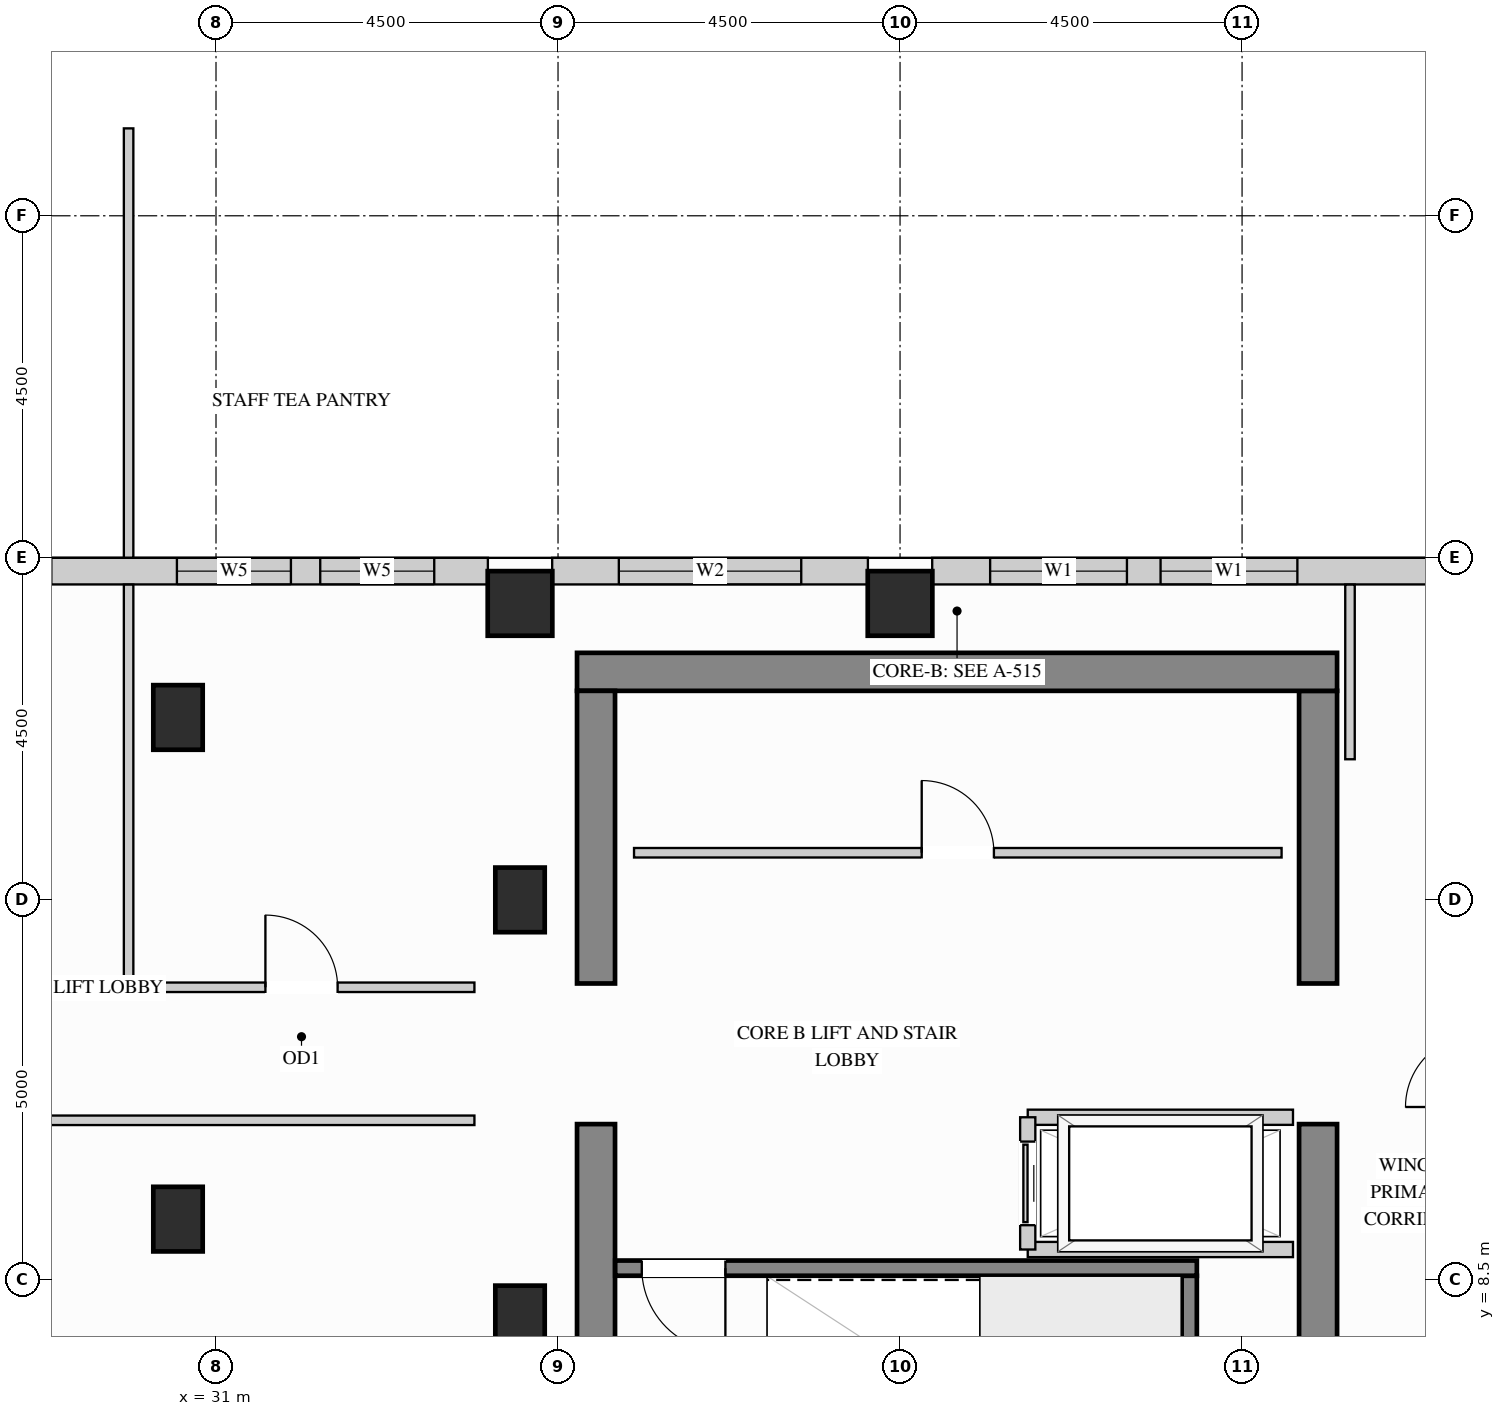
"""IFC4 building model, lengths in metres.
Left out: names, types, materials, properties, quantities, classifications, styles, units other than length and angle.
Written with IfcOpenShell. Run it as: python <this file> out.ifc"""

import sys

from ifc_helpers import new_model, si_unit, direction, frame, frame_2d, origin, origin_2d, place, context, subcontext, project, spatial, rectangle, extrude, source, transform, mapped, element, fill, save


model = new_model("IFC4")
c1 = context("Model", 3, precision=1e-05, world=origin(), true_north=direction((0.0, 1.0)))
c2 = subcontext(c1, "Body", "Model", "MODEL_VIEW")
j1 = project(units=[si_unit("LENGTHUNIT", "METRE"), si_unit("PLANEANGLEUNIT", "RADIAN")], contexts=[c1])
p1 = place(None, origin())
s1 = spatial("IfcSite", under=j1, at=p1, CompositionType="ELEMENT")
p2 = place(p1, origin())
s2 = spatial("IfcBuilding", under=s1, at=p2, CompositionType="ELEMENT")
p3 = place(p2, frame((0.0, 0.0, 212.4)))
s3 = spatial("IfcBuildingStorey", under=s2, at=p3, CompositionType="ELEMENT", Elevation=212.4)
m1 = source(origin(), c2, "Body", "SweptSolid", [
    extrude(rectangle(XDim=0.65, YDim=0.85, at=origin_2d()), origin(), (0.0, 0.0, 1.0), 3.4),
])
for number, where, z_axis, x_axis in (
    (1, (35.0, 13.5, 0.0), (0.0, 0.0, 1.0), (1.0, 0.0, 0.0)),
    (2, (35.0, 8.0, 0.0), (0.0, 0.0, 1.0), (1.0, 0.0, 0.0)),
    (3, (30.5, 15.9, 0.0), (0.0, 0.0, 1.0), (1.0, 0.0, 0.0)),
    (4, (30.5, 9.3, 0.0), (0.0, 0.0, 1.0), (1.0, 0.0, 0.0)),
):
    element("IfcColumn", number, at=place(p3, frame(where, z_axis=z_axis, x_axis=x_axis)), inside=s3, PredefinedType="COLUMN", context=c2, shape_type="MappedRepresentation", body=[
        mapped(m1, transform((0.0, 0.0, 0.0), x_axis=(1.0, 0.0, 0.0), y_axis=(0.0, 1.0, 0.0), z_axis=(0.0, 0.0, 1.0))),
    ])
m2 = source(origin(), c2, "Body", "SweptSolid", [
    extrude(rectangle(XDim=0.85, YDim=0.85, at=origin_2d()), origin(), (0.0, 0.0, 1.0), 3.4),
])
for number, where, z_axis, x_axis in (
    (5, (35.0, 17.4, 0.0), (0.0, 0.0, 1.0), (1.0, 0.0, 0.0)),
    (6, (40.0, 17.4, 0.0), (0.0, 0.0, 1.0), (1.0, 0.0, 0.0)),
):
    element("IfcColumn", number, at=place(p3, frame(where, z_axis=z_axis, x_axis=x_axis)), inside=s3, PredefinedType="COLUMN", context=c2, shape_type="MappedRepresentation", body=[
        mapped(m2, transform((0.0, 0.0, 0.0), x_axis=(1.0, 0.0, 0.0), y_axis=(0.0, 1.0, 0.0), z_axis=(0.0, 0.0, 1.0))),
    ])
m3 = source(origin(), c2, "Body", "SweptSolid", [
    extrude(rectangle(XDim=5.8, YDim=0.5, at=frame_2d((2.9, 0.0))), origin(), (0.0, 0.0, 1.0), 3.4),
])
p4 = place(p3, frame((45.5, 4.75, 0.0), z_axis=(0.0, 0.0, 1.0), x_axis=(0.0, 1.0, 0.0)))
e7 = element("IfcWall", 7, at=p4, inside=s3, PredefinedType="SHEAR", context=c2, shape_type="MappedRepresentation", body=[
    mapped(m3, transform((0.0, 0.0, 0.0), x_axis=(1.0, 0.0, 0.0), y_axis=(0.0, 1.0, 0.0), z_axis=(0.0, 0.0, 1.0))),
])
m4 = source(origin(), c2, "Body", "SweptSolid", [
    extrude(rectangle(XDim=3.85, YDim=0.5, at=frame_2d((1.925, 0.0))), origin(), (0.0, 0.0, 1.0), 3.4),
])
p5 = place(p3, frame((45.5, 12.4, 0.0), z_axis=(0.0, 0.0, 1.0), x_axis=(0.0, 1.0, 0.0)))
e8 = element("IfcWall", 8, at=p5, inside=s3, PredefinedType="SHEAR", context=c2, shape_type="MappedRepresentation", body=[
    mapped(m4, transform((0.0, 0.0, 0.0), x_axis=(1.0, 0.0, 0.0), y_axis=(0.0, 1.0, 0.0), z_axis=(0.0, 0.0, 1.0))),
])
m5 = source(origin(), c2, "Body", "SweptSolid", [
    extrude(rectangle(XDim=10.0, YDim=0.5, at=frame_2d((5.0, 0.0))), origin(), (0.0, 0.0, 1.0), 3.4),
])
p6 = place(p3, frame((35.75, 16.5, 0.0), z_axis=(0.0, 0.0, 1.0), x_axis=(1.0, 0.0, 0.0)))
e9 = element("IfcWall", 9, at=p6, inside=s3, PredefinedType="SHEAR", context=c2, shape_type="MappedRepresentation", body=[
    mapped(m5, transform((0.0, 0.0, 0.0), x_axis=(1.0, 0.0, 0.0), y_axis=(0.0, 1.0, 0.0), z_axis=(0.0, 0.0, 1.0))),
])
p7 = place(p3, frame((36.0, 4.75, 0.0), z_axis=(0.0, 0.0, 1.0), x_axis=(0.0, 1.0, 0.0)))
e10 = element("IfcWall", 10, at=p7, inside=s3, PredefinedType="SHEAR", context=c2, shape_type="MappedRepresentation", body=[
    mapped(m3, transform((0.0, 0.0, 0.0), x_axis=(1.0, 0.0, 0.0), y_axis=(0.0, 1.0, 0.0), z_axis=(0.0, 0.0, 1.0))),
])
p8 = place(p3, frame((36.0, 12.4, 0.0), z_axis=(0.0, 0.0, 1.0), x_axis=(0.0, 1.0, 0.0)))
e11 = element("IfcWall", 11, at=p8, inside=s3, PredefinedType="SHEAR", context=c2, shape_type="MappedRepresentation", body=[
    mapped(m4, transform((0.0, 0.0, 0.0), x_axis=(1.0, 0.0, 0.0), y_axis=(0.0, 1.0, 0.0), z_axis=(0.0, 0.0, 1.0))),
])
p9 = place(p3, frame((47.5, 17.825, 0.0), z_axis=(0.0, 0.0, 1.0), x_axis=(-1.0, 0.0, 0.0)))
e12 = element("IfcWall", 12, at=p9, inside=s3, PredefinedType="SOLIDWALL", context=c2, shape_type="SweptSolid", body=[
    extrude(rectangle(XDim=7.077, YDim=0.35, at=frame_2d((3.539, 0.0))), origin(), (0.0, 0.0, 1.0), 3.385),
])
p10 = place(p9, frame((2.272, 0.0, 0.78)))
e13 = element("IfcOpeningElement", 13, at=p10, cuts=e12, PredefinedType="OPENING", context=c2, shape_type="SweptSolid", body=[
    extrude(rectangle(XDim=1.8, YDim=2.1, at=frame_2d((0.9, 1.05))), frame((0.0, 0.185, 0.0), z_axis=(0.0, -1.0, 0.0), x_axis=(1.0, 0.0, 0.0)), (0.0, 0.0, 1.0), 0.37),
])
p11 = place(p9, frame((4.515, 0.0, 0.78)))
e14 = element("IfcOpeningElement", 14, at=p11, cuts=e12, PredefinedType="OPENING", context=c2, shape_type="SweptSolid", body=[
    extrude(rectangle(XDim=1.8, YDim=2.1, at=frame_2d((0.9, 1.05))), frame((0.0, 0.185, 0.0), z_axis=(0.0, -1.0, 0.0), x_axis=(1.0, 0.0, 0.0)), (0.0, 0.0, 1.0), 0.37),
])
p12 = place(p3, frame((39.577, 17.825, 0.0), z_axis=(0.0, 0.0, 1.0), x_axis=(-1.0, 0.0, 0.0)))
e15 = element("IfcWall", 15, at=p12, inside=s3, PredefinedType="SOLIDWALL", context=c2, shape_type="SweptSolid", body=[
    extrude(rectangle(XDim=4.154, YDim=0.35, at=frame_2d((2.077, 0.0))), origin(), (0.0, 0.0, 1.0), 3.385),
])
p13 = place(p12, frame((0.877, 0.0, 0.78)))
e16 = element("IfcOpeningElement", 16, at=p13, cuts=e15, PredefinedType="OPENING", context=c2, shape_type="SweptSolid", body=[
    extrude(rectangle(XDim=2.4, YDim=2.1, at=frame_2d((1.2, 1.05))), frame((0.0, 0.185, 0.0), z_axis=(0.0, -1.0, 0.0), x_axis=(1.0, 0.0, 0.0)), (0.0, 0.0, 1.0), 0.37),
])
p14 = place(p3, frame((34.577, 17.825, 0.0), z_axis=(0.0, 0.0, 1.0), x_axis=(-1.0, 0.0, 0.0)))
e17 = element("IfcWall", 17, at=p14, inside=s3, PredefinedType="SOLIDWALL", context=c2, shape_type="SweptSolid", body=[
    extrude(rectangle(XDim=15.254, YDim=0.35, at=frame_2d((7.627, 0.0))), origin(), (0.0, 0.0, 1.0), 3.385),
])
p15 = place(p14, frame((0.706, 0.0, 0.78)))
e18 = element("IfcOpeningElement", 18, at=p15, cuts=e17, PredefinedType="OPENING", context=c2, shape_type="SweptSolid", body=[
    extrude(rectangle(XDim=1.5, YDim=2.0, at=frame_2d((0.75, 1.0))), frame((0.0, 0.185, 0.0), z_axis=(0.0, -1.0, 0.0), x_axis=(1.0, 0.0, 0.0)), (0.0, 0.0, 1.0), 0.37),
])
p16 = place(p14, frame((2.591, 0.0, 0.78)))
e19 = element("IfcOpeningElement", 19, at=p16, cuts=e17, PredefinedType="OPENING", context=c2, shape_type="SweptSolid", body=[
    extrude(rectangle(XDim=1.5, YDim=2.0, at=frame_2d((0.75, 1.0))), frame((0.0, 0.185, 0.0), z_axis=(0.0, -1.0, 0.0), x_axis=(1.0, 0.0, 0.0)), (0.0, 0.0, 1.0), 0.37),
])
p17 = place(p14, frame((5.744, 0.0, 0.78)))
e20 = element("IfcOpeningElement", 20, at=p17, cuts=e17, PredefinedType="OPENING", context=c2, shape_type="SweptSolid", body=[
    extrude(rectangle(XDim=1.5, YDim=2.0, at=frame_2d((0.75, 1.0))), frame((0.0, 0.185, 0.0), z_axis=(0.0, -1.0, 0.0), x_axis=(1.0, 0.0, 0.0)), (0.0, 0.0, 1.0), 0.37),
])
p18 = place(p14, frame((8.01, 0.0, 0.78)))
e21 = element("IfcOpeningElement", 21, at=p18, cuts=e17, PredefinedType="OPENING", context=c2, shape_type="SweptSolid", body=[
    extrude(rectangle(XDim=1.5, YDim=2.0, at=frame_2d((0.75, 1.0))), frame((0.0, 0.185, 0.0), z_axis=(0.0, -1.0, 0.0), x_axis=(1.0, 0.0, 0.0)), (0.0, 0.0, 1.0), 0.37),
])
p19 = place(p14, frame((11.163, 0.0, 0.78)))
e22 = element("IfcOpeningElement", 22, at=p19, cuts=e17, PredefinedType="OPENING", context=c2, shape_type="SweptSolid", body=[
    extrude(rectangle(XDim=1.5, YDim=2.0, at=frame_2d((0.75, 1.0))), frame((0.0, 0.185, 0.0), z_axis=(0.0, -1.0, 0.0), x_axis=(1.0, 0.0, 0.0)), (0.0, 0.0, 1.0), 0.37),
])
p20 = place(p14, frame((13.048, 0.0, 0.78)))
e23 = element("IfcOpeningElement", 23, at=p20, cuts=e17, PredefinedType="OPENING", context=c2, shape_type="SweptSolid", body=[
    extrude(rectangle(XDim=1.5, YDim=2.0, at=frame_2d((0.75, 1.0))), frame((0.0, 0.185, 0.0), z_axis=(0.0, -1.0, 0.0), x_axis=(1.0, 0.0, 0.0)), (0.0, 0.0, 1.0), 0.37),
])
p21 = place(p3, frame((36.5, 14.12, 0.0), z_axis=(0.0, 0.0, 1.0), x_axis=(1.0, 0.0, 0.0)))
e24 = element("IfcWall", 24, at=p21, inside=s3, PredefinedType="PARTITIONING", context=c2, shape_type="SweptSolid", body=[
    extrude(rectangle(XDim=8.52, YDim=0.125, at=frame_2d((4.26, 0.0))), origin(), (0.0, 0.0, 1.0), 3.385),
])
p22 = place(p21, frame((3.785, 0.0, 0.0)))
e25 = element("IfcOpeningElement", 25, at=p22, cuts=e24, PredefinedType="OPENING", context=c2, shape_type="SweptSolid", body=[
    extrude(rectangle(XDim=0.95, YDim=2.15, at=frame_2d((0.475, 1.075))), frame((0.0, 0.073, 0.0), z_axis=(0.0, -1.0, 0.0), x_axis=(1.0, 0.0, 0.0)), (0.0, 0.0, 1.0), 0.145),
])
m6 = source(origin(), c2, "Body", "SweptSolid", [
    extrude(rectangle(XDim=2.298, YDim=0.125, at=frame_2d((1.149, 0.0))), origin(), (0.0, 0.0, 1.0), 3.385),
])
p23 = place(p3, frame((45.92, 15.35, 0.0), z_axis=(0.0, 0.0, 1.0), x_axis=(0.0, 1.0, 0.0)))
e26 = element("IfcWall", 26, at=p23, inside=s3, PredefinedType="PARTITIONING", context=c2, shape_type="MappedRepresentation", body=[
    mapped(m6, transform((0.0, 0.0, 0.0), x_axis=(1.0, 0.0, 0.0), y_axis=(0.0, 1.0, 0.0), z_axis=(0.0, 0.0, 1.0))),
])
m7 = source(origin(), c2, "Body", "SweptSolid", [
    extrude(rectangle(XDim=5.298, YDim=0.125, at=frame_2d((2.649, 0.0))), origin(), (0.0, 0.0, 1.0), 3.385),
])
p24 = place(p3, frame((29.85, 12.35, 0.0), z_axis=(0.0, 0.0, 1.0), x_axis=(0.0, 1.0, 0.0)))
e27 = element("IfcWall", 27, at=p24, inside=s3, PredefinedType="PARTITIONING", context=c2, shape_type="MappedRepresentation", body=[
    mapped(m7, transform((0.0, 0.0, 0.0), x_axis=(1.0, 0.0, 0.0), y_axis=(0.0, 1.0, 0.0), z_axis=(0.0, 0.0, 1.0))),
])
m8 = source(origin(), c2, "Body", "SweptSolid", [
    extrude(rectangle(XDim=5.648, YDim=0.125, at=frame_2d((2.824, 0.0))), origin(), (0.0, 0.0, 1.0), 3.385),
])
p25 = place(p3, frame((29.85, 18.002, 0.0), z_axis=(0.0, 0.0, 1.0), x_axis=(0.0, 1.0, 0.0)))
e28 = element("IfcWall", 28, at=p25, inside=s3, PredefinedType="PARTITIONING", context=c2, shape_type="MappedRepresentation", body=[
    mapped(m8, transform((0.0, 0.0, 0.0), x_axis=(1.0, 0.0, 0.0), y_axis=(0.0, 1.0, 0.0), z_axis=(0.0, 0.0, 1.0))),
])
p26 = place(p3, frame((29.85, 12.35, 0.0), z_axis=(0.0, 0.0, 1.0), x_axis=(1.0, 0.0, 0.0)))
e29 = element("IfcWall", 29, at=p26, inside=s3, PredefinedType="PARTITIONING", context=c2, shape_type="SweptSolid", body=[
    extrude(rectangle(XDim=4.55, YDim=0.125, at=frame_2d((2.275, 0.0))), origin(), (0.0, 0.0, 1.0), 3.385),
])
p27 = place(p26, frame((1.8, 0.0, 0.0)))
e30 = element("IfcOpeningElement", 30, at=p27, cuts=e29, PredefinedType="OPENING", context=c2, shape_type="SweptSolid", body=[
    extrude(rectangle(XDim=0.95, YDim=2.15, at=frame_2d((0.475, 1.075))), frame((0.0, 0.073, 0.0), z_axis=(0.0, -1.0, 0.0), x_axis=(1.0, 0.0, 0.0)), (0.0, 0.0, 1.0), 0.145),
])
p28 = place(p3, frame((19.5, 10.6, 0.0), z_axis=(0.0, 0.0, 1.0), x_axis=(1.0, 0.0, 0.0)))
e31 = element("IfcWall", 31, at=p28, inside=s3, PredefinedType="PARTITIONING", context=c2, shape_type="SweptSolid", body=[
    extrude(rectangle(XDim=14.9, YDim=0.125, at=frame_2d((7.45, 0.0))), origin(), (0.0, 0.0, 1.0), 3.385),
])
p29 = place(p28, frame((6.975, 0.0, 0.0)))
e32 = element("IfcOpeningElement", 32, at=p29, cuts=e31, PredefinedType="OPENING", context=c2, shape_type="SweptSolid", body=[
    extrude(rectangle(XDim=0.95, YDim=2.15, at=frame_2d((0.475, 1.075))), frame((0.0, 0.073, 0.0), z_axis=(0.0, -1.0, 0.0), x_axis=(1.0, 0.0, 0.0)), (0.0, 0.0, 1.0), 0.145),
])
m9 = source(origin(), c2, "Body", "SweptSolid", [
    extrude(rectangle(XDim=3.49, YDim=0.2, at=frame_2d((1.745, 0.0))), origin(), (0.0, 0.0, 1.0), 3.385),
])
for number, where, z_axis, x_axis in (
    (33, (41.68, 10.64, 0.0), (0.0, 0.0, 1.0), (1.0, 0.0, 0.0)),
    (34, (41.68, 8.9, 0.0), (0.0, 0.0, 1.0), (1.0, 0.0, 0.0)),
):
    element("IfcWall", number, at=place(p3, frame(where, z_axis=z_axis, x_axis=x_axis)), inside=s3, PredefinedType="PARTITIONING", context=c2, shape_type="MappedRepresentation", body=[
        mapped(m9, transform((0.0, 0.0, 0.0), x_axis=(1.0, 0.0, 0.0), y_axis=(0.0, 1.0, 0.0), z_axis=(0.0, 0.0, 1.0))),
    ])
p30 = place(p3, frame((41.68, 8.9, 0.0), z_axis=(0.0, 0.0, 1.0), x_axis=(0.0, 1.0, 0.0)))
e35 = element("IfcWall", 35, at=p30, inside=s3, PredefinedType="PARTITIONING", context=c2, shape_type="SweptSolid", body=[
    extrude(rectangle(XDim=1.74, YDim=0.2, at=frame_2d((0.87, 0.0))), origin(), (0.0, 0.0, 1.0), 3.385),
])
p31 = place(p30, frame((0.32, 0.0, 0.0)))
e36 = element("IfcOpeningElement", 36, at=p31, cuts=e35, PredefinedType="OPENING", context=c2, shape_type="SweptSolid", body=[
    extrude(rectangle(XDim=1.1, YDim=2.2, at=frame_2d((0.55, 1.1))), frame((0.0, 0.11, 0.0), z_axis=(0.0, -1.0, 0.0), x_axis=(1.0, 0.0, 0.0)), (0.0, 0.0, 1.0), 0.22),
])
m10 = source(origin(), c2, "Body", "SweptSolid", [
    extrude(rectangle(XDim=3.803, YDim=0.2, at=frame_2d((1.901, 0.0))), origin(), (0.0, 0.0, 1.0), 3.4),
])
p32 = place(p3, frame((43.805, 4.752, 0.0), z_axis=(0.0, 0.0, 1.0), x_axis=(0.0, 1.0, 0.0)))
e37 = element("IfcWall", 37, at=p32, inside=s3, PredefinedType="SHEAR", context=c2, shape_type="MappedRepresentation", body=[
    mapped(m10, transform((0.0, 0.0, 0.0), x_axis=(1.0, 0.0, 0.0), y_axis=(0.0, 1.0, 0.0), z_axis=(0.0, 0.0, 1.0))),
])
p33 = place(p3, frame((36.252, 8.655, 0.0), z_axis=(0.0, 0.0, 1.0), x_axis=(1.0, 0.0, 0.0)))
e38 = element("IfcWall", 38, at=p33, inside=s3, PredefinedType="SHEAR", context=c2, shape_type="SweptSolid", body=[
    extrude(rectangle(XDim=7.653, YDim=0.2, at=frame_2d((3.827, 0.0))), origin(), (0.0, 0.0, 1.0), 3.4),
])
p34 = place(p33, frame((0.35, 0.0, 0.0)))
e39 = element("IfcOpeningElement", 39, at=p34, cuts=e38, PredefinedType="OPENING", context=c2, shape_type="SweptSolid", body=[
    extrude(rectangle(XDim=1.1, YDim=2.15, at=frame_2d((0.55, 1.075))), frame((0.0, 0.11, 0.0), z_axis=(0.0, -1.0, 0.0), x_axis=(1.0, 0.0, 0.0)), (0.0, 0.0, 1.0), 0.22),
])
m11 = source(origin(), c2, "Body", "SweptSolid", [
    extrude(rectangle(XDim=1.1, YDim=2.2, at=frame_2d((0.55, 1.1))), frame((0.0, 0.025, 0.0), z_axis=(0.0, -1.0, 0.0), x_axis=(1.0, 0.0, 0.0)), (0.0, 0.0, 1.0), 0.05),
])
p35 = place(p31, origin())
e40 = element("IfcDoor", 40, at=p35, inside=s3, OperationType="SLIDING_TO_LEFT", PredefinedType="DOOR", context=c2, shape_type="MappedRepresentation", body=[
    mapped(m11, transform((0.0, 0.0, 0.0), x_axis=(1.0, 0.0, 0.0), y_axis=(0.0, 1.0, 0.0), z_axis=(0.0, 0.0, 1.0))),
])
fill(e36, e40)
m12 = source(origin(), c2, "Body", "SweptSolid", [
    extrude(rectangle(XDim=0.95, YDim=2.15, at=frame_2d((0.475, 1.075))), frame((0.0, 0.025, 0.0), z_axis=(0.0, -1.0, 0.0), x_axis=(1.0, 0.0, 0.0)), (0.0, 0.0, 1.0), 0.05),
])
p36 = place(p22, origin())
e41 = element("IfcDoor", 41, at=p36, inside=s3, OperationType="SINGLE_SWING_LEFT", PredefinedType="DOOR", context=c2, shape_type="MappedRepresentation", body=[
    mapped(m12, transform((0.0, 0.0, 0.0), x_axis=(1.0, 0.0, 0.0), y_axis=(0.0, 1.0, 0.0), z_axis=(0.0, 0.0, 1.0))),
])
fill(e25, e41)
p37 = place(p27, origin())
e42 = element("IfcDoor", 42, at=p37, inside=s3, OperationType="SINGLE_SWING_LEFT", PredefinedType="DOOR", context=c2, shape_type="MappedRepresentation", body=[
    mapped(m12, transform((0.0, 0.0, 0.0), x_axis=(1.0, 0.0, 0.0), y_axis=(0.0, 1.0, 0.0), z_axis=(0.0, 0.0, 1.0))),
])
fill(e30, e42)
m13 = source(origin(), c2, "Body", "SweptSolid", [
    extrude(rectangle(XDim=1.1, YDim=2.15, at=frame_2d((0.55, 1.075))), frame((0.0, 0.025, 0.0), z_axis=(0.0, -1.0, 0.0), x_axis=(1.0, 0.0, 0.0)), (0.0, 0.0, 1.0), 0.05),
])
p38 = place(p34, origin())
e43 = element("IfcDoor", 43, at=p38, inside=s3, OperationType="SINGLE_SWING_RIGHT", PredefinedType="DOOR", context=c2, shape_type="MappedRepresentation", body=[
    mapped(m13, transform((0.0, 0.0, 0.0), x_axis=(1.0, 0.0, 0.0), y_axis=(0.0, 1.0, 0.0), z_axis=(0.0, 0.0, 1.0))),
])
fill(e39, e43)
m14 = source(origin(), c2, "Body", "SweptSolid", [
    extrude(rectangle(XDim=1.8, YDim=2.1, at=frame_2d((0.9, 1.05))), frame((0.0, 0.03, 0.0), z_axis=(0.0, -1.0, 0.0), x_axis=(1.0, 0.0, 0.0)), (0.0, 0.0, 1.0), 0.06),
])
p39 = place(p10, origin())
e44 = element("IfcWindow", 44, at=p39, inside=s3, PartitioningType="SINGLE_PANEL", PredefinedType="WINDOW", context=c2, shape_type="MappedRepresentation", body=[
    mapped(m14, transform((0.0, 0.0, 0.0), x_axis=(1.0, 0.0, 0.0), y_axis=(0.0, 1.0, 0.0), z_axis=(0.0, 0.0, 1.0))),
])
fill(e13, e44)
p40 = place(p11, origin())
e45 = element("IfcWindow", 45, at=p40, inside=s3, PartitioningType="SINGLE_PANEL", PredefinedType="WINDOW", context=c2, shape_type="MappedRepresentation", body=[
    mapped(m14, transform((0.0, 0.0, 0.0), x_axis=(1.0, 0.0, 0.0), y_axis=(0.0, 1.0, 0.0), z_axis=(0.0, 0.0, 1.0))),
])
fill(e14, e45)
m15 = source(origin(), c2, "Body", "SweptSolid", [
    extrude(rectangle(XDim=2.4, YDim=2.1, at=frame_2d((1.2, 1.05))), frame((0.0, 0.03, 0.0), z_axis=(0.0, -1.0, 0.0), x_axis=(1.0, 0.0, 0.0)), (0.0, 0.0, 1.0), 0.06),
])
p41 = place(p13, origin())
e46 = element("IfcWindow", 46, at=p41, inside=s3, PartitioningType="SINGLE_PANEL", PredefinedType="WINDOW", context=c2, shape_type="MappedRepresentation", body=[
    mapped(m15, transform((0.0, 0.0, 0.0), x_axis=(1.0, 0.0, 0.0), y_axis=(0.0, 1.0, 0.0), z_axis=(0.0, 0.0, 1.0))),
])
fill(e16, e46)
m16 = source(origin(), c2, "Body", "SweptSolid", [
    extrude(rectangle(XDim=1.5, YDim=2.0, at=frame_2d((0.75, 1.0))), frame((0.0, 0.03, 0.0), z_axis=(0.0, -1.0, 0.0), x_axis=(1.0, 0.0, 0.0)), (0.0, 0.0, 1.0), 0.06),
])
p42 = place(p15, origin())
e47 = element("IfcWindow", 47, at=p42, inside=s3, PartitioningType="SINGLE_PANEL", PredefinedType="WINDOW", context=c2, shape_type="MappedRepresentation", body=[
    mapped(m16, transform((0.0, 0.0, 0.0), x_axis=(1.0, 0.0, 0.0), y_axis=(0.0, 1.0, 0.0), z_axis=(0.0, 0.0, 1.0))),
])
fill(e18, e47)
p43 = place(p16, origin())
e48 = element("IfcWindow", 48, at=p43, inside=s3, PartitioningType="SINGLE_PANEL", PredefinedType="WINDOW", context=c2, shape_type="MappedRepresentation", body=[
    mapped(m16, transform((0.0, 0.0, 0.0), x_axis=(1.0, 0.0, 0.0), y_axis=(0.0, 1.0, 0.0), z_axis=(0.0, 0.0, 1.0))),
])
fill(e19, e48)
save(model, sys.argv[1])
